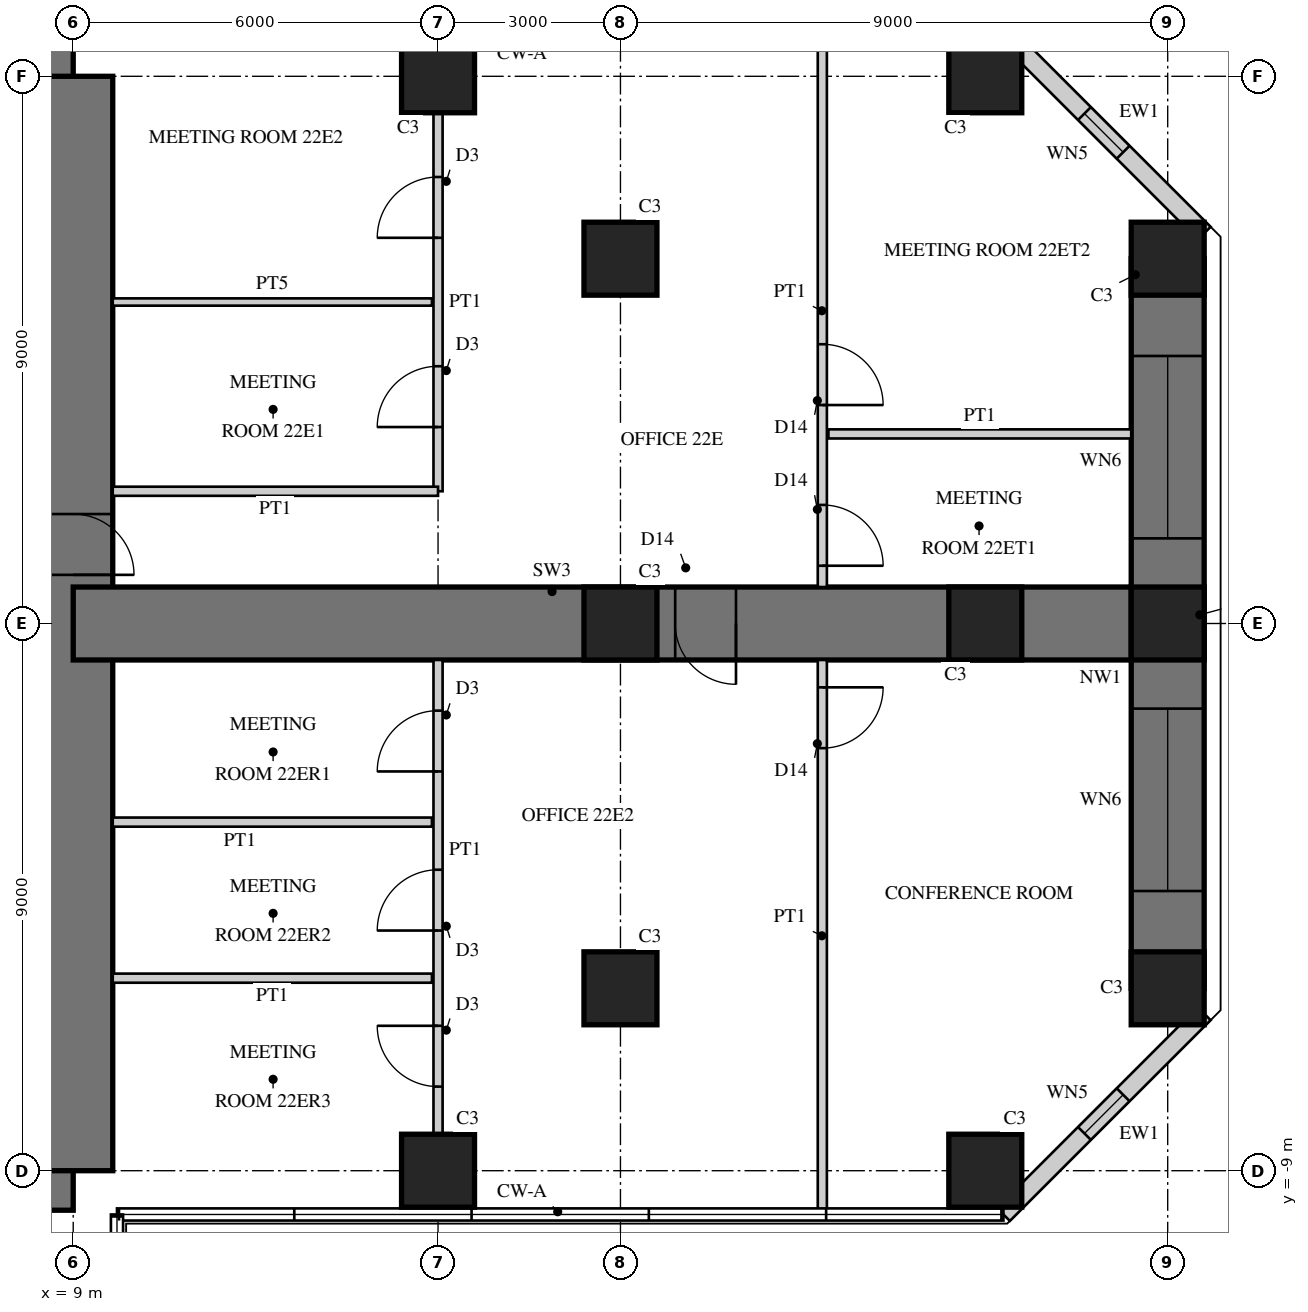
"""IFC4 building model, lengths in metres.
Left out: names, types, materials, properties, quantities, classifications, styles, units other than length and angle.
Written with IfcOpenShell. Run it as: python <this file> out.ifc"""

import sys

from ifc_helpers import new_model, si_unit, direction, frame, frame_2d, origin, origin_2d, place, context, subcontext, project, spatial, rectangle, hollow_rectangle, extrude, element, fill, save


model = new_model("IFC4")
c1 = context("Model", 3, precision=1e-05, world=origin(), true_north=direction((0.0, 1.0)))
c2 = subcontext(c1, "Body", "Model", "MODEL_VIEW")
j1 = project(units=[si_unit("LENGTHUNIT", "METRE"), si_unit("PLANEANGLEUNIT", "RADIAN")], contexts=[c1])
p1 = place(None, origin())
s1 = spatial("IfcSite", under=j1, at=p1, CompositionType="ELEMENT")
p2 = place(p1, origin())
s2 = spatial("IfcBuilding", under=s1, at=p2, CompositionType="ELEMENT")
p3 = place(p2, frame((0.0, 0.0, 91.5)))
s3 = spatial("IfcBuildingStorey", under=s2, at=p3, CompositionType="ELEMENT", Elevation=91.5)
p4 = place(p3, frame((9.0, 9.0, 0.0), z_axis=(0.0, 0.0, 1.0), x_axis=(-1.0, 0.0, 0.0)))
e1 = element("IfcWall", 1, at=p4, inside=s3, PredefinedType="SHEAR", context=c2, shape_type="SweptSolid", body=[
    extrude(rectangle(XDim=18.0, YDim=1.3, at=frame_2d((9.0, 0.0))), origin(), (0.0, 0.0, 1.0), 4.0),
])
p5 = place(p4, frame((9.8, 0.0, 0.0)))
e2 = element("IfcOpeningElement", 2, at=p5, cuts=e1, PredefinedType="OPENING", context=c2, shape_type="SweptSolid", body=[
    extrude(rectangle(XDim=1.0, YDim=2.4, at=frame_2d((0.5, 1.2))), frame((0.0, 0.66, 0.0), z_axis=(0.0, -1.0, 0.0), x_axis=(1.0, 0.0, 0.0)), (0.0, 0.0, 1.0), 1.32),
])
p6 = place(p3, frame((-9.0, -9.0, 0.0), z_axis=(0.0, 0.0, 1.0), x_axis=(1.0, 0.0, 0.0)))
e3 = element("IfcWall", 3, at=p6, inside=s3, PredefinedType="SHEAR", context=c2, shape_type="SweptSolid", body=[
    extrude(rectangle(XDim=18.0, YDim=1.3, at=frame_2d((9.0, 0.0))), origin(), (0.0, 0.0, 1.0), 4.0),
])
p7 = place(p6, frame((9.8, 0.0, 0.0)))
e4 = element("IfcOpeningElement", 4, at=p7, cuts=e3, PredefinedType="OPENING", context=c2, shape_type="SweptSolid", body=[
    extrude(rectangle(XDim=1.0, YDim=2.4, at=frame_2d((0.5, 1.2))), frame((0.0, 0.66, 0.0), z_axis=(0.0, -1.0, 0.0), x_axis=(1.0, 0.0, 0.0)), (0.0, 0.0, 1.0), 1.32),
])
p8 = place(p3, frame((9.0, -9.0, 0.0), z_axis=(0.0, 0.0, 1.0), x_axis=(0.0, 1.0, 0.0)))
e5 = element("IfcWall", 5, at=p8, inside=s3, PredefinedType="SHEAR", context=c2, shape_type="SweptSolid", body=[
    extrude(rectangle(XDim=18.0, YDim=1.3, at=frame_2d((9.0, 0.0))), origin(), (0.0, 0.0, 1.0), 4.0),
])
p9 = place(p8, frame((9.8, 0.0, 0.0)))
e6 = element("IfcOpeningElement", 6, at=p9, cuts=e5, PredefinedType="OPENING", context=c2, shape_type="SweptSolid", body=[
    extrude(rectangle(XDim=1.0, YDim=2.4, at=frame_2d((0.5, 1.2))), frame((0.0, 0.66, 0.0), z_axis=(0.0, -1.0, 0.0), x_axis=(1.0, 0.0, 0.0)), (0.0, 0.0, 1.0), 1.32),
])
p10 = place(p3, frame((9.0, 0.0, 0.0), z_axis=(0.0, 0.0, 1.0), x_axis=(1.0, 0.0, 0.0)))
e7 = element("IfcWall", 7, at=p10, inside=s3, PredefinedType="SHEAR", context=c2, shape_type="SweptSolid", body=[
    extrude(rectangle(XDim=18.0, YDim=1.2, at=frame_2d((9.0, 0.0))), origin(), (0.0, 0.0, 1.0), 4.0),
])
p11 = place(p10, frame((9.9, 0.0, 0.0)))
e8 = element("IfcOpeningElement", 8, at=p11, cuts=e7, PredefinedType="OPENING", context=c2, shape_type="SweptSolid", body=[
    extrude(rectangle(XDim=1.0, YDim=2.2, at=frame_2d((0.5, 1.1))), frame((0.0, 0.61, 0.0), z_axis=(0.0, -1.0, 0.0), x_axis=(1.0, 0.0, 0.0)), (0.0, 0.0, 1.0), 1.22),
])
p12 = place(p3, frame((27.0, -6.0, 0.0), z_axis=(0.0, 0.0, 1.0), x_axis=(0.0, 1.0, 0.0)))
e9 = element("IfcWall", 9, at=p12, inside=s3, PredefinedType="SHEAR", context=c2, shape_type="SweptSolid", body=[
    extrude(rectangle(XDim=12.0, YDim=1.2, at=frame_2d((6.0, 0.0))), origin(), (0.0, 0.0, 1.0), 4.0),
])
p13 = place(p12, frame((1.6, 0.0, 0.6)))
e10 = element("IfcOpeningElement", 10, at=p13, cuts=e9, PredefinedType="OPENING", context=c2, shape_type="SweptSolid", body=[
    extrude(rectangle(XDim=3.0, YDim=2.4, at=frame_2d((1.5, 1.2))), frame((0.0, 0.61, 0.0), z_axis=(0.0, -1.0, 0.0), x_axis=(1.0, 0.0, 0.0)), (0.0, 0.0, 1.0), 1.22),
])
p14 = place(p12, frame((7.4, 0.0, 0.6)))
e11 = element("IfcOpeningElement", 11, at=p14, cuts=e9, PredefinedType="OPENING", context=c2, shape_type="SweptSolid", body=[
    extrude(rectangle(XDim=3.0, YDim=2.4, at=frame_2d((1.5, 1.2))), frame((0.0, 0.61, 0.0), z_axis=(0.0, -1.0, 0.0), x_axis=(1.0, 0.0, 0.0)), (0.0, 0.0, 1.0), 1.22),
])
for number, where, z_axis, x_axis in (
    (12, (15.0, -9.0, 0.0), (0.0, 0.0, 1.0), (1.0, 0.0, 0.0)),
    (13, (24.0, -9.0, 0.0), (0.0, 0.0, 1.0), (1.0, 0.0, 0.0)),
    (14, (15.0, 9.0, 0.0), (0.0, 0.0, 1.0), (1.0, 0.0, 0.0)),
    (15, (24.0, 9.0, 0.0), (0.0, 0.0, 1.0), (1.0, 0.0, 0.0)),
    (16, (27.0, -6.0, 0.0), (0.0, 0.0, 1.0), (1.0, 0.0, 0.0)),
    (17, (27.0, 0.0, 0.0), (0.0, 0.0, 1.0), (1.0, 0.0, 0.0)),
    (18, (27.0, 6.0, 0.0), (0.0, 0.0, 1.0), (1.0, 0.0, 0.0)),
    (19, (18.0, -6.0, 0.0), (0.0, 0.0, 1.0), (1.0, 0.0, 0.0)),
    (20, (18.0, 0.0, 0.0), (0.0, 0.0, 1.0), (1.0, 0.0, 0.0)),
    (21, (18.0, 6.0, 0.0), (0.0, 0.0, 1.0), (1.0, 0.0, 0.0)),
    (22, (24.0, 0.0, 0.0), (0.0, 0.0, 1.0), (1.0, 0.0, 0.0)),
):
    element("IfcColumn", number, at=place(p3, frame(where, z_axis=z_axis, x_axis=x_axis)), inside=s3, PredefinedType="COLUMN", context=c2, shape_type="SweptSolid", body=[
        extrude(rectangle(XDim=1.2, YDim=1.2, at=origin_2d()), origin(), (0.0, 0.0, 1.0), 4.0),
    ])
p15 = place(p3, frame((24.298, -9.72, 0.0), z_axis=(0.0, 0.0, 1.0), x_axis=(0.707106781187, 0.707106781187, 0.0)))
e23 = element("IfcWall", 23, at=p15, inside=s3, PredefinedType="SOLIDWALL", context=c2, shape_type="SweptSolid", body=[
    extrude(rectangle(XDim=4.669, YDim=0.3, at=frame_2d((2.335, 0.0))), origin(), (0.0, 0.0, 1.0), 3.75),
])
p16 = place(p15, frame((1.885, 0.0, 0.3)))
e24 = element("IfcOpeningElement", 24, at=p16, cuts=e23, PredefinedType="OPENING", context=c2, shape_type="SweptSolid", body=[
    extrude(rectangle(XDim=0.9, YDim=2.4, at=frame_2d((0.45, 1.2))), frame((0.0, 0.16, 0.0), z_axis=(0.0, -1.0, 0.0), x_axis=(1.0, 0.0, 0.0)), (0.0, 0.0, 1.0), 0.32),
])
p17 = place(p3, frame((27.6, 6.418, 0.0), z_axis=(0.0, 0.0, 1.0), x_axis=(-0.707106781187, 0.707106781187, 0.0)))
e25 = element("IfcWall", 25, at=p17, inside=s3, PredefinedType="SOLIDWALL", context=c2, shape_type="SweptSolid", body=[
    extrude(rectangle(XDim=4.669, YDim=0.3, at=frame_2d((2.335, 0.0))), origin(), (0.0, 0.0, 1.0), 3.75),
])
p18 = place(p17, frame((1.885, 0.0, 0.3)))
e26 = element("IfcOpeningElement", 26, at=p18, cuts=e25, PredefinedType="OPENING", context=c2, shape_type="SweptSolid", body=[
    extrude(rectangle(XDim=0.9, YDim=2.4, at=frame_2d((0.45, 1.2))), frame((0.0, 0.16, 0.0), z_axis=(0.0, -1.0, 0.0), x_axis=(1.0, 0.0, 0.0)), (0.0, 0.0, 1.0), 0.32),
])
p19 = place(p3, frame((15.0, 2.175, 0.0), z_axis=(0.0, 0.0, 1.0), x_axis=(0.0, 1.0, 0.0)))
e27 = element("IfcWall", 27, at=p19, inside=s3, PredefinedType="PARTITIONING", context=c2, shape_type="SweptSolid", body=[
    extrude(rectangle(XDim=6.225, YDim=0.15, at=frame_2d((3.112, 0.0))), origin(), (0.0, 0.0, 1.0), 2.7),
])
p20 = place(p19, frame((1.056, 0.0, 0.0)))
e28 = element("IfcOpeningElement", 28, at=p20, cuts=e27, PredefinedType="OPENING", context=c2, shape_type="SweptSolid", body=[
    extrude(rectangle(XDim=1.0, YDim=2.1, at=frame_2d((0.5, 1.05))), frame((0.0, 0.085, 0.0), z_axis=(0.0, -1.0, 0.0), x_axis=(1.0, 0.0, 0.0)), (0.0, 0.0, 1.0), 0.17),
])
p21 = place(p19, frame((4.169, 0.0, 0.0)))
e29 = element("IfcOpeningElement", 29, at=p21, cuts=e27, PredefinedType="OPENING", context=c2, shape_type="SweptSolid", body=[
    extrude(rectangle(XDim=1.0, YDim=2.1, at=frame_2d((0.5, 1.05))), frame((0.0, 0.085, 0.0), z_axis=(0.0, -1.0, 0.0), x_axis=(1.0, 0.0, 0.0)), (0.0, 0.0, 1.0), 0.17),
])
p22 = place(p3, frame((9.65, 2.175, 0.0), z_axis=(0.0, 0.0, 1.0), x_axis=(1.0, 0.0, 0.0)))
e30 = element("IfcWall", 30, at=p22, inside=s3, PredefinedType="PARTITIONING", context=c2, shape_type="SweptSolid", body=[
    extrude(rectangle(XDim=5.35, YDim=0.15, at=frame_2d((2.675, 0.0))), origin(), (0.0, 0.0, 1.0), 3.75),
])
p23 = place(p3, frame((9.65, 5.288, 0.0), z_axis=(0.0, 0.0, 1.0), x_axis=(1.0, 0.0, 0.0)))
e31 = element("IfcWall", 31, at=p23, inside=s3, PredefinedType="PLUMBINGWALL", context=c2, shape_type="SweptSolid", body=[
    extrude(rectangle(XDim=5.25, YDim=0.12, at=frame_2d((2.625, 0.0))), origin(), (0.0, 0.0, 1.0), 3.75),
])
p24 = place(p3, frame((15.0, -8.4, 0.0), z_axis=(0.0, 0.0, 1.0), x_axis=(0.0, 1.0, 0.0)))
e32 = element("IfcWall", 32, at=p24, inside=s3, PredefinedType="PARTITIONING", context=c2, shape_type="SweptSolid", body=[
    extrude(rectangle(XDim=7.8, YDim=0.15, at=frame_2d((3.9, 0.0))), origin(), (0.0, 0.0, 1.0), 2.7),
])
p25 = place(p24, frame((0.783, 0.0, 0.0)))
e33 = element("IfcOpeningElement", 33, at=p25, cuts=e32, PredefinedType="OPENING", context=c2, shape_type="SweptSolid", body=[
    extrude(rectangle(XDim=1.0, YDim=2.1, at=frame_2d((0.5, 1.05))), frame((0.0, 0.085, 0.0), z_axis=(0.0, -1.0, 0.0), x_axis=(1.0, 0.0, 0.0)), (0.0, 0.0, 1.0), 0.17),
])
p26 = place(p24, frame((3.35, 0.0, 0.0)))
e34 = element("IfcOpeningElement", 34, at=p26, cuts=e32, PredefinedType="OPENING", context=c2, shape_type="SweptSolid", body=[
    extrude(rectangle(XDim=1.0, YDim=2.1, at=frame_2d((0.5, 1.05))), frame((0.0, 0.085, 0.0), z_axis=(0.0, -1.0, 0.0), x_axis=(1.0, 0.0, 0.0)), (0.0, 0.0, 1.0), 0.17),
])
p27 = place(p24, frame((5.967, 0.0, 0.0)))
e35 = element("IfcOpeningElement", 35, at=p27, cuts=e32, PredefinedType="OPENING", context=c2, shape_type="SweptSolid", body=[
    extrude(rectangle(XDim=1.0, YDim=2.1, at=frame_2d((0.5, 1.05))), frame((0.0, 0.085, 0.0), z_axis=(0.0, -1.0, 0.0), x_axis=(1.0, 0.0, 0.0)), (0.0, 0.0, 1.0), 0.17),
])
p28 = place(p3, frame((9.65, -3.267, 0.0), z_axis=(0.0, 0.0, 1.0), x_axis=(1.0, 0.0, 0.0)))
e36 = element("IfcWall", 36, at=p28, inside=s3, PredefinedType="PARTITIONING", context=c2, shape_type="SweptSolid", body=[
    extrude(rectangle(XDim=5.25, YDim=0.15, at=frame_2d((2.625, 0.0))), origin(), (0.0, 0.0, 1.0), 3.75),
])
p29 = place(p3, frame((9.65, -5.833, 0.0), z_axis=(0.0, 0.0, 1.0), x_axis=(1.0, 0.0, 0.0)))
e37 = element("IfcWall", 37, at=p29, inside=s3, PredefinedType="PARTITIONING", context=c2, shape_type="SweptSolid", body=[
    extrude(rectangle(XDim=5.25, YDim=0.15, at=frame_2d((2.625, 0.0))), origin(), (0.0, 0.0, 1.0), 2.8),
])
p30 = place(p3, frame((21.42, 3.118, 0.0), z_axis=(0.0, 0.0, 1.0), x_axis=(1.0, 0.0, 0.0)))
e38 = element("IfcWall", 38, at=p30, inside=s3, PredefinedType="PARTITIONING", context=c2, shape_type="SweptSolid", body=[
    extrude(rectangle(XDim=4.98, YDim=0.15, at=frame_2d((2.49, 0.0))), origin(), (0.0, 0.0, 1.0), 3.75),
])
p31 = place(p3, frame((21.32, 0.6, 0.0), z_axis=(0.0, 0.0, 1.0), x_axis=(0.0, 1.0, 0.0)))
e39 = element("IfcWall", 39, at=p31, inside=s3, PredefinedType="PARTITIONING", context=c2, shape_type="SweptSolid", body=[
    extrude(rectangle(XDim=9.08, YDim=0.15, at=frame_2d((4.54, 0.0))), origin(), (0.0, 0.0, 1.0), 3.75),
])
p32 = place(p31, frame((0.35, 0.0, 0.0)))
e40 = element("IfcOpeningElement", 40, at=p32, cuts=e39, PredefinedType="OPENING", context=c2, shape_type="SweptSolid", body=[
    extrude(rectangle(XDim=1.0, YDim=2.2, at=frame_2d((0.5, 1.1))), frame((0.0, 0.085, 0.0), z_axis=(0.0, -1.0, 0.0), x_axis=(1.0, 0.0, 0.0)), (0.0, 0.0, 1.0), 0.17),
])
p33 = place(p31, frame((2.993, 0.0, 0.0)))
e41 = element("IfcOpeningElement", 41, at=p33, cuts=e39, PredefinedType="OPENING", context=c2, shape_type="SweptSolid", body=[
    extrude(rectangle(XDim=1.0, YDim=2.2, at=frame_2d((0.5, 1.1))), frame((0.0, 0.085, 0.0), z_axis=(0.0, -1.0, 0.0), x_axis=(1.0, 0.0, 0.0)), (0.0, 0.0, 1.0), 0.17),
])
p34 = place(p3, frame((21.32, -9.68, 0.0), z_axis=(0.0, 0.0, 1.0), x_axis=(0.0, 1.0, 0.0)))
e42 = element("IfcWall", 42, at=p34, inside=s3, PredefinedType="PARTITIONING", context=c2, shape_type="SweptSolid", body=[
    extrude(rectangle(XDim=9.08, YDim=0.15, at=frame_2d((4.54, 0.0))), origin(), (0.0, 0.0, 1.0), 3.75),
])
p35 = place(p34, frame((7.63, 0.0, 0.0)))
e43 = element("IfcOpeningElement", 43, at=p35, cuts=e42, PredefinedType="OPENING", context=c2, shape_type="SweptSolid", body=[
    extrude(rectangle(XDim=1.0, YDim=2.2, at=frame_2d((0.5, 1.1))), frame((0.0, 0.085, 0.0), z_axis=(0.0, -1.0, 0.0), x_axis=(1.0, 0.0, 0.0)), (0.0, 0.0, 1.0), 0.17),
])
p36 = place(p16, origin())
e44 = element("IfcWindow", 44, at=p36, inside=s3, PartitioningType="SINGLE_PANEL", PredefinedType="WINDOW", context=c2, shape_type="SweptSolid", body=[
    extrude(hollow_rectangle(XDim=0.9, YDim=2.4, WallThickness=0.06, at=frame_2d((0.45, 1.2))), frame((0.0, 0.03, 0.0), z_axis=(0.0, -1.0, 0.0), x_axis=(1.0, 0.0, 0.0)), (0.0, 0.0, 1.0), 0.06),
    extrude(rectangle(XDim=0.779, YDim=2.279, at=frame_2d((0.45, 1.2))), frame((0.0, 0.03, 0.0), z_axis=(0.0, -1.0, 0.0), x_axis=(1.0, 0.0, 0.0)), (0.0, 0.0, 1.0), 0.06),
])
fill(e24, e44)
p37 = place(p13, origin())
e45 = element("IfcWindow", 45, at=p37, inside=s3, PartitioningType="SINGLE_PANEL", PredefinedType="WINDOW", context=c2, shape_type="SweptSolid", body=[
    extrude(hollow_rectangle(XDim=3.0, YDim=2.4, WallThickness=0.06, at=frame_2d((1.5, 1.2))), frame((0.0, 0.03, 0.0), z_axis=(0.0, -1.0, 0.0), x_axis=(1.0, 0.0, 0.0)), (0.0, 0.0, 1.0), 0.06),
    extrude(rectangle(XDim=2.879, YDim=2.279, at=frame_2d((1.5, 1.2))), frame((0.0, 0.03, 0.0), z_axis=(0.0, -1.0, 0.0), x_axis=(1.0, 0.0, 0.0)), (0.0, 0.0, 1.0), 0.06),
])
fill(e10, e45)
p38 = place(p14, origin())
e46 = element("IfcWindow", 46, at=p38, inside=s3, PartitioningType="SINGLE_PANEL", PredefinedType="WINDOW", context=c2, shape_type="SweptSolid", body=[
    extrude(hollow_rectangle(XDim=3.0, YDim=2.4, WallThickness=0.06, at=frame_2d((1.5, 1.2))), frame((0.0, 0.03, 0.0), z_axis=(0.0, -1.0, 0.0), x_axis=(1.0, 0.0, 0.0)), (0.0, 0.0, 1.0), 0.06),
    extrude(rectangle(XDim=2.879, YDim=2.279, at=frame_2d((1.5, 1.2))), frame((0.0, 0.03, 0.0), z_axis=(0.0, -1.0, 0.0), x_axis=(1.0, 0.0, 0.0)), (0.0, 0.0, 1.0), 0.06),
])
fill(e11, e46)
p39 = place(p18, origin())
e47 = element("IfcWindow", 47, at=p39, inside=s3, PartitioningType="SINGLE_PANEL", PredefinedType="WINDOW", context=c2, shape_type="SweptSolid", body=[
    extrude(hollow_rectangle(XDim=0.9, YDim=2.4, WallThickness=0.06, at=frame_2d((0.45, 1.2))), frame((0.0, 0.03, 0.0), z_axis=(0.0, -1.0, 0.0), x_axis=(1.0, 0.0, 0.0)), (0.0, 0.0, 1.0), 0.06),
    extrude(rectangle(XDim=0.779, YDim=2.279, at=frame_2d((0.45, 1.2))), frame((0.0, 0.03, 0.0), z_axis=(0.0, -1.0, 0.0), x_axis=(1.0, 0.0, 0.0)), (0.0, 0.0, 1.0), 0.06),
])
fill(e26, e47)
p40 = place(p20, origin())
e48 = element("IfcDoor", 48, at=p40, inside=s3, OperationType="SINGLE_SWING_LEFT", PredefinedType="DOOR", context=c2, shape_type="SweptSolid", body=[
    extrude(rectangle(XDim=1.0, YDim=2.1, at=frame_2d((0.5, 1.05))), frame((0.0, 0.025, 0.0), z_axis=(0.0, -1.0, 0.0), x_axis=(1.0, 0.0, 0.0)), (0.0, 0.0, 1.0), 0.05),
])
fill(e28, e48)
p41 = place(p21, origin())
e49 = element("IfcDoor", 49, at=p41, inside=s3, OperationType="SINGLE_SWING_LEFT", PredefinedType="DOOR", context=c2, shape_type="SweptSolid", body=[
    extrude(rectangle(XDim=1.0, YDim=2.1, at=frame_2d((0.5, 1.05))), frame((0.0, 0.025, 0.0), z_axis=(0.0, -1.0, 0.0), x_axis=(1.0, 0.0, 0.0)), (0.0, 0.0, 1.0), 0.05),
])
fill(e29, e49)
p42 = place(p25, origin())
e50 = element("IfcDoor", 50, at=p42, inside=s3, OperationType="SINGLE_SWING_RIGHT", PredefinedType="DOOR", context=c2, shape_type="SweptSolid", body=[
    extrude(rectangle(XDim=1.0, YDim=2.1, at=frame_2d((0.5, 1.05))), frame((0.0, 0.025, 0.0), z_axis=(0.0, -1.0, 0.0), x_axis=(1.0, 0.0, 0.0)), (0.0, 0.0, 1.0), 0.05),
])
fill(e33, e50)
p43 = place(p26, origin())
e51 = element("IfcDoor", 51, at=p43, inside=s3, OperationType="SINGLE_SWING_LEFT", PredefinedType="DOOR", context=c2, shape_type="SweptSolid", body=[
    extrude(rectangle(XDim=1.0, YDim=2.1, at=frame_2d((0.5, 1.05))), frame((0.0, 0.025, 0.0), z_axis=(0.0, -1.0, 0.0), x_axis=(1.0, 0.0, 0.0)), (0.0, 0.0, 1.0), 0.05),
])
fill(e34, e51)
p44 = place(p27, origin())
e52 = element("IfcDoor", 52, at=p44, inside=s3, OperationType="SINGLE_SWING_LEFT", PredefinedType="DOOR", context=c2, shape_type="SweptSolid", body=[
    extrude(rectangle(XDim=1.0, YDim=2.1, at=frame_2d((0.5, 1.05))), frame((0.0, 0.025, 0.0), z_axis=(0.0, -1.0, 0.0), x_axis=(1.0, 0.0, 0.0)), (0.0, 0.0, 1.0), 0.05),
])
fill(e35, e52)
p45 = place(p32, frame((1.0, 0.0, 0.0), z_axis=(0.0, 0.0, 1.0), x_axis=(-1.0, 0.0, 0.0)))
e53 = element("IfcDoor", 53, at=p45, inside=s3, OperationType="SINGLE_SWING_RIGHT", PredefinedType="DOOR", context=c2, shape_type="SweptSolid", body=[
    extrude(rectangle(XDim=1.0, YDim=2.2, at=frame_2d((0.5, 1.1))), frame((0.0, 0.025, 0.0), z_axis=(0.0, -1.0, 0.0), x_axis=(1.0, 0.0, 0.0)), (0.0, 0.0, 1.0), 0.05),
])
fill(e40, e53)
p46 = place(p33, frame((1.0, 0.0, 0.0), z_axis=(0.0, 0.0, 1.0), x_axis=(-1.0, 0.0, 0.0)))
e54 = element("IfcDoor", 54, at=p46, inside=s3, OperationType="SINGLE_SWING_RIGHT", PredefinedType="DOOR", context=c2, shape_type="SweptSolid", body=[
    extrude(rectangle(XDim=1.0, YDim=2.2, at=frame_2d((0.5, 1.1))), frame((0.0, 0.025, 0.0), z_axis=(0.0, -1.0, 0.0), x_axis=(1.0, 0.0, 0.0)), (0.0, 0.0, 1.0), 0.05),
])
fill(e41, e54)
p47 = place(p35, frame((1.0, 0.0, 0.0), z_axis=(0.0, 0.0, 1.0), x_axis=(-1.0, 0.0, 0.0)))
e55 = element("IfcDoor", 55, at=p47, inside=s3, OperationType="SINGLE_SWING_LEFT", PredefinedType="DOOR", context=c2, shape_type="SweptSolid", body=[
    extrude(rectangle(XDim=1.0, YDim=2.2, at=frame_2d((0.5, 1.1))), frame((0.0, 0.025, 0.0), z_axis=(0.0, -1.0, 0.0), x_axis=(1.0, 0.0, 0.0)), (0.0, 0.0, 1.0), 0.05),
])
fill(e43, e55)
p48 = place(p11, frame((1.0, 0.0, 0.0), z_axis=(0.0, 0.0, 1.0), x_axis=(-1.0, 0.0, 0.0)))
e56 = element("IfcDoor", 56, at=p48, inside=s3, OperationType="SINGLE_SWING_LEFT", PredefinedType="DOOR", context=c2, shape_type="SweptSolid", body=[
    extrude(rectangle(XDim=1.0, YDim=2.2, at=frame_2d((0.5, 1.1))), frame((0.0, 0.025, 0.0), z_axis=(0.0, -1.0, 0.0), x_axis=(1.0, 0.0, 0.0)), (0.0, 0.0, 1.0), 0.05),
])
fill(e8, e56)
p49 = place(p9, frame((1.0, 0.0, 0.0), z_axis=(0.0, 0.0, 1.0), x_axis=(-1.0, 0.0, 0.0)))
e57 = element("IfcDoor", 57, at=p49, inside=s3, OperationType="SINGLE_SWING_RIGHT", PredefinedType="DOOR", context=c2, shape_type="SweptSolid", body=[
    extrude(rectangle(XDim=1.0, YDim=2.4, at=frame_2d((0.5, 1.2))), frame((0.0, -0.005, 0.0), z_axis=(0.0, -1.0, 0.0), x_axis=(1.0, 0.0, 0.0)), (0.0, 0.0, 1.0), 0.05),
])
fill(e6, e57)
save(model, sys.argv[1])
